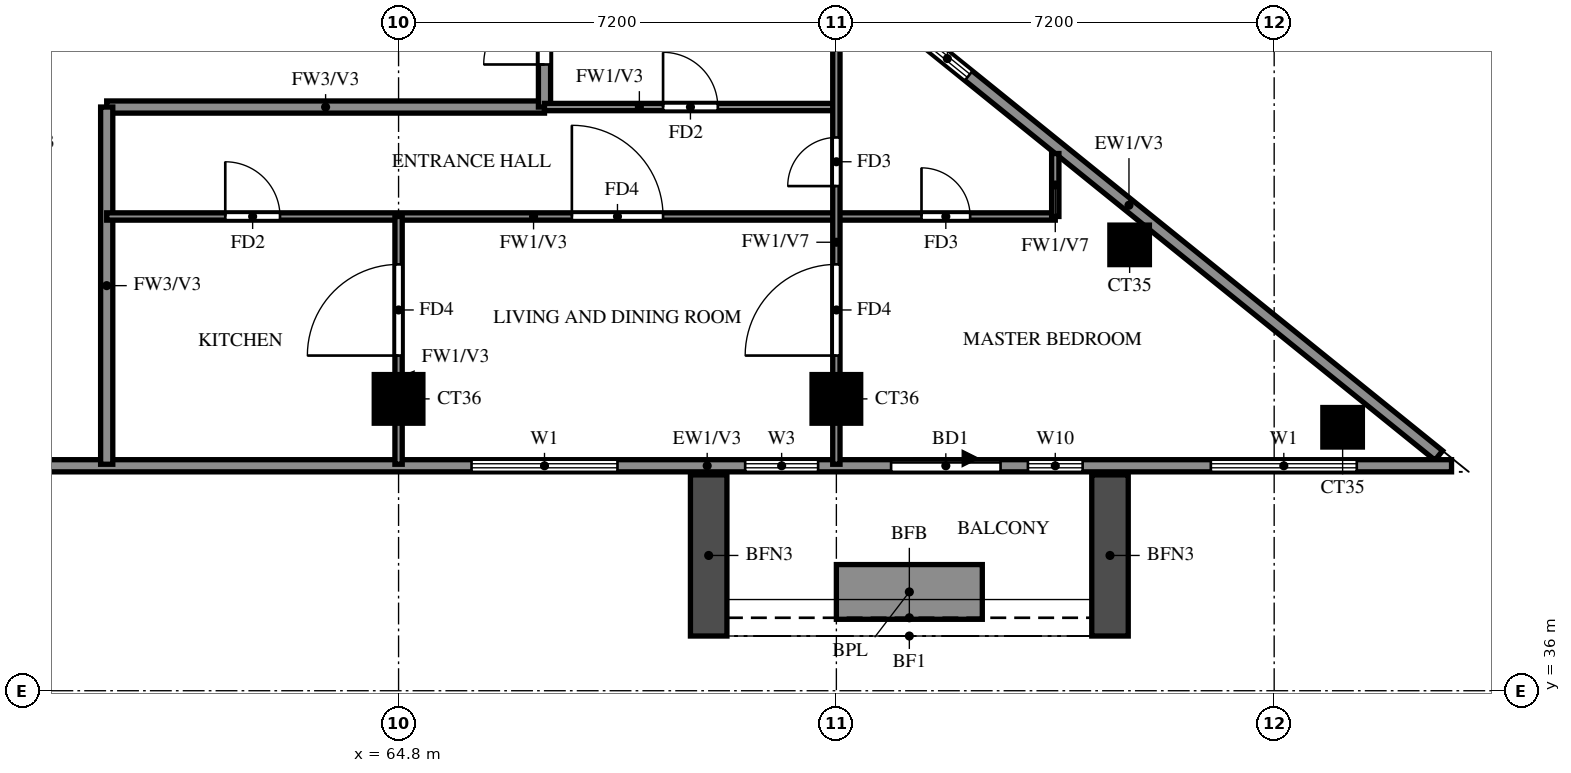
"""IFC4 building model, lengths in metres.
Left out: names, types, materials, properties, quantities, classifications, styles, units other than length and angle.
Written with IfcOpenShell. Run it as: python <this file> out.ifc"""

import sys

from ifc_helpers import new_model, si_unit, direction, frame, frame_2d, origin, origin_2d, place, context, subcontext, project, spatial, rectangle, extrude, source, transform, mapped, element, fill, save


model = new_model("IFC4")
c1 = context("Model", 3, precision=1e-05, world=origin(), true_north=direction((0.0, 1.0)))
c2 = subcontext(c1, "Body", "Model", "MODEL_VIEW")
j1 = project(units=[si_unit("LENGTHUNIT", "METRE"), si_unit("PLANEANGLEUNIT", "RADIAN")], contexts=[c1])
p1 = place(None, origin())
s1 = spatial("IfcSite", under=j1, at=p1, CompositionType="ELEMENT")
p2 = place(p1, origin())
s2 = spatial("IfcBuilding", under=s1, at=p2, CompositionType="ELEMENT")
p3 = place(p2, frame((0.0, 0.0, 239.5)))
s3 = spatial("IfcBuildingStorey", under=s2, at=p3, CompositionType="ELEMENT", Elevation=239.5)
m1 = source(origin(), c2, "Body", "SweptSolid", [
    extrude(rectangle(XDim=0.65, YDim=0.65, at=origin_2d()), origin(), (0.0, 0.0, 1.0), 3.22),
])
p4 = place(p3, frame((80.326, 40.333, 0.0), z_axis=(0.0, 0.0, 1.0), x_axis=(1.0, 0.0, 0.0)))
e1 = element("IfcColumn", 1, at=p4, inside=s3, PredefinedType="COLUMN", context=c2, shape_type="MappedRepresentation", body=[
    mapped(m1, transform((0.0, 0.0, 0.0))),
])
m2 = source(origin(), c2, "Body", "SweptSolid", [
    extrude(rectangle(XDim=0.8, YDim=0.8, at=origin_2d()), origin(), (0.0, 0.0, 1.0), 3.22),
])
for number, where, z_axis, x_axis in (
    (2, (64.8, 40.8, 0.0), (0.0, 0.0, 1.0), (1.0, 0.0, 0.0)),
    (3, (72.0, 40.8, 0.0), (0.0, 0.0, 1.0), (1.0, 0.0, 0.0)),
):
    element("IfcColumn", number, at=place(p3, frame(where, z_axis=z_axis, x_axis=x_axis)), inside=s3, PredefinedType="COLUMN", context=c2, shape_type="MappedRepresentation", body=[
        mapped(m2, transform((0.0, 0.0, 0.0))),
    ])
p5 = place(p3, frame((76.823, 43.333, 0.0), z_axis=(0.0, 0.0, 1.0), x_axis=(1.0, 0.0, 0.0)))
e4 = element("IfcColumn", 4, at=p5, inside=s3, PredefinedType="COLUMN", context=c2, shape_type="MappedRepresentation", body=[
    mapped(m1, transform((0.0, 0.0, 0.0))),
])
p6 = place(p3, frame((81.907, 39.87, 0.0), z_axis=(0.0, 0.0, 1.0), x_axis=(-0.777936274417, 0.62834318087, 0.0)))
e5 = element("IfcWall", 5, at=p6, inside=s3, PredefinedType="SOLIDWALL", context=c2, shape_type="SweptSolid", body=[
    extrude(rectangle(XDim=13.099, YDim=0.2, at=frame_2d((6.549, 0.0))), origin(), (0.0, 0.0, 1.0), 3.22),
])
p7 = place(p6, frame((9.938, 0.0, 1.5)))
e6 = element("IfcOpeningElement", 6, at=p7, cuts=e5, PredefinedType="OPENING", context=c2, shape_type="SweptSolid", body=[
    extrude(rectangle(XDim=0.9, YDim=0.9, at=frame_2d((0.45, 0.45))), frame((0.0, 0.11, 0.0), z_axis=(0.0, -1.0, 0.0), x_axis=(1.0, 0.0, 0.0)), (0.0, 0.0, 1.0), 0.22),
])
p8 = place(p3, frame((58.8, 39.7, 0.0), z_axis=(0.0, 0.0, 1.0), x_axis=(1.0, 0.0, 0.0)))
e7 = element("IfcWall", 7, at=p8, inside=s3, PredefinedType="SOLIDWALL", context=c2, shape_type="SweptSolid", body=[
    extrude(rectangle(XDim=23.317, YDim=0.2, at=frame_2d((11.658, 0.0))), origin(), (0.0, 0.0, 1.0), 3.22),
])
p9 = place(p8, frame((14.1, 0.0, 0.0)))
e8 = element("IfcOpeningElement", 8, at=p9, cuts=e7, PredefinedType="OPENING", context=c2, shape_type="SweptSolid", body=[
    extrude(rectangle(XDim=1.8, YDim=2.4, at=frame_2d((0.9, 1.2))), frame((0.0, 0.11, 0.0), z_axis=(0.0, -1.0, 0.0), x_axis=(1.0, 0.0, 0.0)), (0.0, 0.0, 1.0), 0.22),
])
p10 = place(p8, frame((7.2, 0.0, 0.6)))
e9 = element("IfcOpeningElement", 9, at=p10, cuts=e7, PredefinedType="OPENING", context=c2, shape_type="SweptSolid", body=[
    extrude(rectangle(XDim=2.4, YDim=2.4, at=frame_2d((1.2, 1.2))), frame((0.0, 0.11, 0.0), z_axis=(0.0, -1.0, 0.0), x_axis=(1.0, 0.0, 0.0)), (0.0, 0.0, 1.0), 0.22),
])
p11 = place(p8, frame((11.7, 0.0, 0.6)))
e10 = element("IfcOpeningElement", 10, at=p11, cuts=e7, PredefinedType="OPENING", context=c2, shape_type="SweptSolid", body=[
    extrude(rectangle(XDim=1.2, YDim=2.4, at=frame_2d((0.6, 1.2))), frame((0.0, 0.11, 0.0), z_axis=(0.0, -1.0, 0.0), x_axis=(1.0, 0.0, 0.0)), (0.0, 0.0, 1.0), 0.22),
])
p12 = place(p8, frame((16.35, 0.0, 0.6)))
e11 = element("IfcOpeningElement", 11, at=p12, cuts=e7, PredefinedType="OPENING", context=c2, shape_type="SweptSolid", body=[
    extrude(rectangle(XDim=0.9, YDim=2.4, at=frame_2d((0.45, 1.2))), frame((0.0, 0.11, 0.0), z_axis=(0.0, -1.0, 0.0), x_axis=(1.0, 0.0, 0.0)), (0.0, 0.0, 1.0), 0.22),
])
p13 = place(p8, frame((19.358, 0.0, 0.6)))
e12 = element("IfcOpeningElement", 12, at=p13, cuts=e7, PredefinedType="OPENING", context=c2, shape_type="SweptSolid", body=[
    extrude(rectangle(XDim=2.4, YDim=2.4, at=frame_2d((1.2, 1.2))), frame((0.0, 0.11, 0.0), z_axis=(0.0, -1.0, 0.0), x_axis=(1.0, 0.0, 0.0)), (0.0, 0.0, 1.0), 0.22),
])
for number, where, z_axis, x_axis in (
    (13, (69.9, 39.55, 0.0), (0.0, 0.0, 1.0), (0.0, -1.0, 0.0)),
    (14, (76.5, 39.55, 0.0), (0.0, 0.0, 1.0), (0.0, -1.0, 0.0)),
):
    element("IfcWall", number, at=place(p3, frame(where, z_axis=z_axis, x_axis=x_axis)), inside=s3, PredefinedType="SOLIDWALL", context=c2, shape_type="SweptSolid", body=[
        extrude(rectangle(XDim=2.65, YDim=0.6, at=frame_2d((1.325, 0.0))), origin(), (0.0, 0.0, 1.0), 2.85),
    ])
p14 = place(p3, frame((72.0, 37.625, 0.0), z_axis=(0.0, 0.0, 1.0), x_axis=(1.0, 0.0, 0.0)))
e15 = element("IfcWall", 15, at=p14, inside=s3, PredefinedType="SOLIDWALL", context=c2, shape_type="SweptSolid", body=[
    extrude(rectangle(XDim=2.4, YDim=0.9, at=frame_2d((1.2, 0.0))), origin(), (0.0, 0.0, 1.0), 0.9),
])
p15 = place(p3, frame((60.0, 45.6, 0.0), z_axis=(0.0, 0.0, 1.0), x_axis=(1.0, 0.0, 0.0)))
e16 = element("IfcWall", 16, at=p15, inside=s3, PredefinedType="SOLIDWALL", context=c2, shape_type="SweptSolid", body=[
    extrude(rectangle(XDim=7.2, YDim=0.2, at=frame_2d((3.6, 0.0))), origin(), (0.0, 0.0, 1.0), 3.22),
])
p16 = place(p3, frame((60.0, 39.725, 0.0), z_axis=(0.0, 0.0, 1.0), x_axis=(0.0, 1.0, 0.0)))
e17 = element("IfcWall", 17, at=p16, inside=s3, PredefinedType="SOLIDWALL", context=c2, shape_type="SweptSolid", body=[
    extrude(rectangle(XDim=5.875, YDim=0.2, at=frame_2d((2.938, 0.0))), origin(), (0.0, 0.0, 1.0), 3.22),
])
p17 = place(p3, frame((67.2, 45.6, 0.0), z_axis=(0.0, 0.0, 1.0), x_axis=(0.0, 1.0, 0.0)))
e18 = element("IfcWall", 18, at=p17, inside=s3, PredefinedType="SOLIDWALL", context=c2, shape_type="SweptSolid", body=[
    extrude(rectangle(XDim=16.8, YDim=0.2, at=frame_2d((8.4, 0.0))), origin(), (0.0, 0.0, 1.0), 3.22),
])
p18 = place(p17, frame((6.7, 0.0, 0.0)))
e19 = element("IfcOpeningElement", 19, at=p18, cuts=e18, PredefinedType="OPENING", context=c2, shape_type="SweptSolid", body=[
    extrude(rectangle(XDim=1.0, YDim=2.1, at=frame_2d((0.5, 1.05))), frame((0.0, 0.11, 0.0), z_axis=(0.0, -1.0, 0.0), x_axis=(1.0, 0.0, 0.0)), (0.0, 0.0, 1.0), 0.22),
])
p19 = place(p17, frame((15.1, 0.0, 0.0)))
e20 = element("IfcOpeningElement", 20, at=p19, cuts=e18, PredefinedType="OPENING", context=c2, shape_type="SweptSolid", body=[
    extrude(rectangle(XDim=1.0, YDim=2.1, at=frame_2d((0.5, 1.05))), frame((0.0, 0.11, 0.0), z_axis=(0.0, -1.0, 0.0), x_axis=(1.0, 0.0, 0.0)), (0.0, 0.0, 1.0), 0.22),
])
p20 = place(p17, frame((0.7, 0.0, 0.0)))
e21 = element("IfcOpeningElement", 21, at=p20, cuts=e18, PredefinedType="OPENING", context=c2, shape_type="SweptSolid", body=[
    extrude(rectangle(XDim=1.0, YDim=2.1, at=frame_2d((0.5, 1.05))), frame((0.0, 0.11, 0.0), z_axis=(0.0, -1.0, 0.0), x_axis=(1.0, 0.0, 0.0)), (0.0, 0.0, 1.0), 0.22),
])
p21 = place(p3, frame((60.0, 43.8, 0.0), z_axis=(0.0, 0.0, 1.0), x_axis=(1.0, 0.0, 0.0)))
e22 = element("IfcWall", 22, at=p21, inside=s3, PredefinedType="PARTITIONING", context=c2, shape_type="SweptSolid", body=[
    extrude(rectangle(XDim=15.6, YDim=0.12, at=frame_2d((7.8, 0.0))), origin(), (0.0, 0.0, 1.0), 3.22),
])
p22 = place(p21, frame((7.65, 0.0, 0.0)))
e23 = element("IfcOpeningElement", 23, at=p22, cuts=e22, PredefinedType="OPENING", context=c2, shape_type="SweptSolid", body=[
    extrude(rectangle(XDim=1.5, YDim=2.1, at=frame_2d((0.75, 1.05))), frame((0.0, 0.07, 0.0), z_axis=(0.0, -1.0, 0.0), x_axis=(1.0, 0.0, 0.0)), (0.0, 0.0, 1.0), 0.14),
])
p23 = place(p21, frame((1.95, 0.0, 0.0)))
e24 = element("IfcOpeningElement", 24, at=p23, cuts=e22, PredefinedType="OPENING", context=c2, shape_type="SweptSolid", body=[
    extrude(rectangle(XDim=0.9, YDim=2.1, at=frame_2d((0.45, 1.05))), frame((0.0, 0.07, 0.0), z_axis=(0.0, -1.0, 0.0), x_axis=(1.0, 0.0, 0.0)), (0.0, 0.0, 1.0), 0.14),
])
p24 = place(p21, frame((13.4, 0.0, 0.0)))
e25 = element("IfcOpeningElement", 25, at=p24, cuts=e22, PredefinedType="OPENING", context=c2, shape_type="SweptSolid", body=[
    extrude(rectangle(XDim=0.8, YDim=2.1, at=frame_2d((0.4, 1.05))), frame((0.0, 0.07, 0.0), z_axis=(0.0, -1.0, 0.0), x_axis=(1.0, 0.0, 0.0)), (0.0, 0.0, 1.0), 0.14),
])
p25 = place(p3, frame((67.2, 45.6, 0.0), z_axis=(0.0, 0.0, 1.0), x_axis=(1.0, 0.0, 0.0)))
e26 = element("IfcWall", 26, at=p25, inside=s3, PredefinedType="PARTITIONING", context=c2, shape_type="SweptSolid", body=[
    extrude(rectangle(XDim=4.8, YDim=0.12, at=frame_2d((2.4, 0.0))), origin(), (0.0, 0.0, 1.0), 3.22),
])
p26 = place(p25, frame((1.95, 0.0, 0.0)))
e27 = element("IfcOpeningElement", 27, at=p26, cuts=e26, PredefinedType="OPENING", context=c2, shape_type="SweptSolid", body=[
    extrude(rectangle(XDim=0.9, YDim=2.1, at=frame_2d((0.45, 1.05))), frame((0.0, 0.07, 0.0), z_axis=(0.0, -1.0, 0.0), x_axis=(1.0, 0.0, 0.0)), (0.0, 0.0, 1.0), 0.14),
])
p27 = place(p3, frame((64.8, 39.725, 0.0), z_axis=(0.0, 0.0, 1.0), x_axis=(0.0, 1.0, 0.0)))
e28 = element("IfcWall", 28, at=p27, inside=s3, PredefinedType="PARTITIONING", context=c2, shape_type="SweptSolid", body=[
    extrude(rectangle(XDim=4.075, YDim=0.12, at=frame_2d((2.038, 0.0))), origin(), (0.0, 0.0, 1.0), 3.22),
])
p28 = place(p27, frame((1.788, 0.0, 0.0)))
e29 = element("IfcOpeningElement", 29, at=p28, cuts=e28, PredefinedType="OPENING", context=c2, shape_type="SweptSolid", body=[
    extrude(rectangle(XDim=1.5, YDim=2.1, at=frame_2d((0.75, 1.05))), frame((0.0, 0.07, 0.0), z_axis=(0.0, -1.0, 0.0), x_axis=(1.0, 0.0, 0.0)), (0.0, 0.0, 1.0), 0.14),
])
p29 = place(p3, frame((72.0, 39.725, 0.0), z_axis=(0.0, 0.0, 1.0), x_axis=(0.0, 1.0, 0.0)))
e30 = element("IfcWall", 30, at=p29, inside=s3, PredefinedType="PARTITIONING", context=c2, shape_type="SweptSolid", body=[
    extrude(rectangle(XDim=8.114, YDim=0.12, at=frame_2d((4.057, 0.0))), origin(), (0.0, 0.0, 1.0), 2.32),
])
p30 = place(p29, frame((1.788, 0.0, 0.0)))
e31 = element("IfcOpeningElement", 31, at=p30, cuts=e30, PredefinedType="OPENING", context=c2, shape_type="SweptSolid", body=[
    extrude(rectangle(XDim=1.5, YDim=2.1, at=frame_2d((0.75, 1.05))), frame((0.0, 0.07, 0.0), z_axis=(0.0, -1.0, 0.0), x_axis=(1.0, 0.0, 0.0)), (0.0, 0.0, 1.0), 0.14),
])
p31 = place(p29, frame((4.575, 0.0, 0.0)))
e32 = element("IfcOpeningElement", 32, at=p31, cuts=e30, PredefinedType="OPENING", context=c2, shape_type="SweptSolid", body=[
    extrude(rectangle(XDim=0.8, YDim=2.1, at=frame_2d((0.4, 1.05))), frame((0.0, 0.07, 0.0), z_axis=(0.0, -1.0, 0.0), x_axis=(1.0, 0.0, 0.0)), (0.0, 0.0, 1.0), 0.14),
])
p32 = place(p3, frame((75.6, 43.8, 0.0), z_axis=(0.0, 0.0, 1.0), x_axis=(0.0, 1.0, 0.0)))
e33 = element("IfcWall", 33, at=p32, inside=s3, PredefinedType="PARTITIONING", context=c2, shape_type="SweptSolid", body=[
    extrude(rectangle(XDim=1.035, YDim=0.12, at=frame_2d((0.518, 0.0))), origin(), (0.0, 0.0, 1.0), 2.32),
])
p33 = place(p7, origin())
e34 = element("IfcWindow", 34, at=p33, inside=s3, PartitioningType="SINGLE_PANEL", PredefinedType="WINDOW", context=c2, shape_type="SweptSolid", body=[
    extrude(rectangle(XDim=0.9, YDim=0.9, at=frame_2d((0.45, 0.45))), frame((0.0, 0.03, 0.0), z_axis=(0.0, -1.0, 0.0), x_axis=(1.0, 0.0, 0.0)), (0.0, 0.0, 1.0), 0.06),
])
fill(e6, e34)
p34 = place(p9, origin())
e35 = element("IfcDoor", 35, at=p34, inside=s3, OperationType="DOUBLE_DOOR_SLIDING", PredefinedType="DOOR", context=c2, shape_type="SweptSolid", body=[
    extrude(rectangle(XDim=1.8, YDim=2.4, at=frame_2d((0.9, 1.2))), frame((0.0, 0.025, 0.0), z_axis=(0.0, -1.0, 0.0), x_axis=(1.0, 0.0, 0.0)), (0.0, 0.0, 1.0), 0.05),
])
fill(e8, e35)
p35 = place(p10, origin())
e36 = element("IfcWindow", 36, at=p35, inside=s3, PartitioningType="DOUBLE_PANEL_VERTICAL", PredefinedType="WINDOW", context=c2, shape_type="SweptSolid", body=[
    extrude(rectangle(XDim=2.4, YDim=2.4, at=frame_2d((1.2, 1.2))), frame((0.0, 0.03, 0.0), z_axis=(0.0, -1.0, 0.0), x_axis=(1.0, 0.0, 0.0)), (0.0, 0.0, 1.0), 0.06),
])
fill(e9, e36)
p36 = place(p11, origin())
e37 = element("IfcWindow", 37, at=p36, inside=s3, PartitioningType="SINGLE_PANEL", PredefinedType="WINDOW", context=c2, shape_type="SweptSolid", body=[
    extrude(rectangle(XDim=1.2, YDim=2.4, at=frame_2d((0.6, 1.2))), frame((0.0, 0.03, 0.0), z_axis=(0.0, -1.0, 0.0), x_axis=(1.0, 0.0, 0.0)), (0.0, 0.0, 1.0), 0.06),
])
fill(e10, e37)
p37 = place(p12, origin())
e38 = element("IfcWindow", 38, at=p37, inside=s3, PartitioningType="SINGLE_PANEL", PredefinedType="WINDOW", context=c2, shape_type="SweptSolid", body=[
    extrude(rectangle(XDim=0.9, YDim=2.4, at=frame_2d((0.45, 1.2))), frame((0.0, 0.03, 0.0), z_axis=(0.0, -1.0, 0.0), x_axis=(1.0, 0.0, 0.0)), (0.0, 0.0, 1.0), 0.06),
])
fill(e11, e38)
p38 = place(p13, origin())
e39 = element("IfcWindow", 39, at=p38, inside=s3, PartitioningType="DOUBLE_PANEL_VERTICAL", PredefinedType="WINDOW", context=c2, shape_type="SweptSolid", body=[
    extrude(rectangle(XDim=2.4, YDim=2.4, at=frame_2d((1.2, 1.2))), frame((0.0, 0.03, 0.0), z_axis=(0.0, -1.0, 0.0), x_axis=(1.0, 0.0, 0.0)), (0.0, 0.0, 1.0), 0.06),
])
fill(e12, e39)
p39 = place(p28, origin())
e40 = element("IfcDoor", 40, at=p39, inside=s3, OperationType="SINGLE_SWING_RIGHT", PredefinedType="DOOR", context=c2, shape_type="SweptSolid", body=[
    extrude(rectangle(XDim=1.5, YDim=2.1, at=frame_2d((0.75, 1.05))), frame((0.0, 0.025, 0.0), z_axis=(0.0, -1.0, 0.0), x_axis=(1.0, 0.0, 0.0)), (0.0, 0.0, 1.0), 0.05),
])
fill(e29, e40)
p40 = place(p26, origin())
e41 = element("IfcDoor", 41, at=p40, inside=s3, OperationType="SINGLE_SWING_RIGHT", PredefinedType="DOOR", context=c2, shape_type="SweptSolid", body=[
    extrude(rectangle(XDim=0.9, YDim=2.1, at=frame_2d((0.45, 1.05))), frame((0.0, 0.025, 0.0), z_axis=(0.0, -1.0, 0.0), x_axis=(1.0, 0.0, 0.0)), (0.0, 0.0, 1.0), 0.05),
])
fill(e27, e41)
p41 = place(p20, origin())
e42 = element("IfcDoor", 42, at=p41, inside=s3, OperationType="SINGLE_SWING_LEFT", PredefinedType="DOOR", context=c2, shape_type="SweptSolid", body=[
    extrude(rectangle(XDim=1.0, YDim=2.1, at=frame_2d((0.5, 1.05))), frame((0.0, 0.025, 0.0), z_axis=(0.0, -1.0, 0.0), x_axis=(1.0, 0.0, 0.0)), (0.0, 0.0, 1.0), 0.05),
])
fill(e21, e42)
p42 = place(p22, origin())
e43 = element("IfcDoor", 43, at=p42, inside=s3, OperationType="SINGLE_SWING_LEFT", PredefinedType="DOOR", context=c2, shape_type="SweptSolid", body=[
    extrude(rectangle(XDim=1.5, YDim=2.1, at=frame_2d((0.75, 1.05))), frame((0.0, 0.025, 0.0), z_axis=(0.0, -1.0, 0.0), x_axis=(1.0, 0.0, 0.0)), (0.0, 0.0, 1.0), 0.05),
])
fill(e23, e43)
p43 = place(p23, origin())
e44 = element("IfcDoor", 44, at=p43, inside=s3, OperationType="SINGLE_SWING_RIGHT", PredefinedType="DOOR", context=c2, shape_type="SweptSolid", body=[
    extrude(rectangle(XDim=0.9, YDim=2.1, at=frame_2d((0.45, 1.05))), frame((0.0, 0.025, 0.0), z_axis=(0.0, -1.0, 0.0), x_axis=(1.0, 0.0, 0.0)), (0.0, 0.0, 1.0), 0.05),
])
fill(e24, e44)
p44 = place(p30, origin())
e45 = element("IfcDoor", 45, at=p44, inside=s3, OperationType="SINGLE_SWING_RIGHT", PredefinedType="DOOR", context=c2, shape_type="SweptSolid", body=[
    extrude(rectangle(XDim=1.5, YDim=2.1, at=frame_2d((0.75, 1.05))), frame((0.0, 0.025, 0.0), z_axis=(0.0, -1.0, 0.0), x_axis=(1.0, 0.0, 0.0)), (0.0, 0.0, 1.0), 0.05),
])
fill(e31, e45)
p45 = place(p31, origin())
e46 = element("IfcDoor", 46, at=p45, inside=s3, OperationType="SINGLE_SWING_LEFT", PredefinedType="DOOR", context=c2, shape_type="SweptSolid", body=[
    extrude(rectangle(XDim=0.8, YDim=2.1, at=frame_2d((0.4, 1.05))), frame((0.0, 0.025, 0.0), z_axis=(0.0, -1.0, 0.0), x_axis=(1.0, 0.0, 0.0)), (0.0, 0.0, 1.0), 0.05),
])
fill(e32, e46)
p46 = place(p24, origin())
e47 = element("IfcDoor", 47, at=p46, inside=s3, OperationType="SINGLE_SWING_RIGHT", PredefinedType="DOOR", context=c2, shape_type="SweptSolid", body=[
    extrude(rectangle(XDim=0.8, YDim=2.1, at=frame_2d((0.4, 1.05))), frame((0.0, 0.025, 0.0), z_axis=(0.0, -1.0, 0.0), x_axis=(1.0, 0.0, 0.0)), (0.0, 0.0, 1.0), 0.05),
])
fill(e25, e47)
save(model, sys.argv[1])
